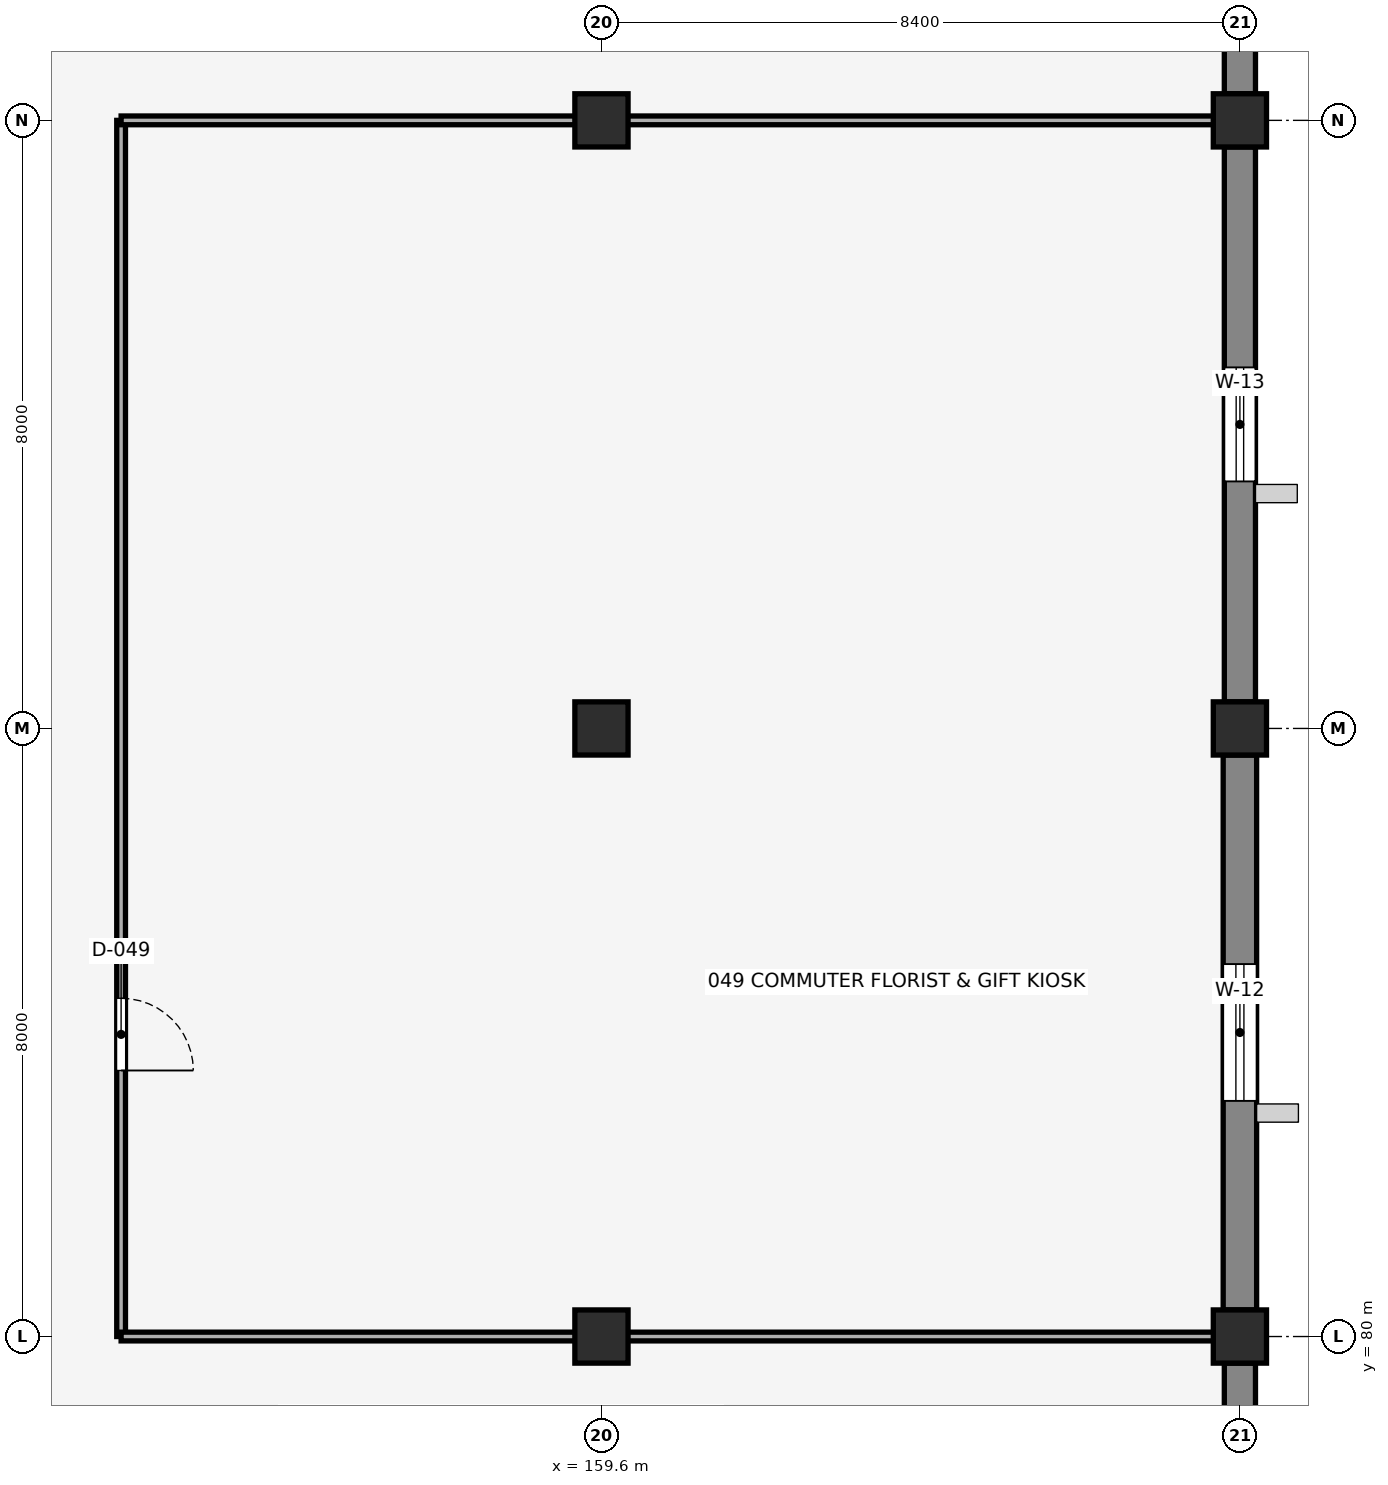
"""IFC4 building model, lengths in metres.
Left out: names, types, materials, properties, quantities, classifications, styles, units other than length and angle.
Written with IfcOpenShell. Run it as: python <this file> out.ifc"""

import sys

from ifc_helpers import new_model, si_unit, direction, frame, frame_2d, origin, origin_2d, place, context, subcontext, project, spatial, rectangle, extrude, element, fill, save


model = new_model("IFC4")
c1 = context("Model", 3, precision=1e-05, world=origin(), true_north=direction((0.0, 1.0)))
c2 = subcontext(c1, "Body", "Model", "MODEL_VIEW")
j1 = project(units=[si_unit("LENGTHUNIT", "METRE"), si_unit("PLANEANGLEUNIT", "RADIAN")], contexts=[c1])
p1 = place(None, origin())
s1 = spatial("IfcSite", under=j1, at=p1, CompositionType="ELEMENT")
p2 = place(p1, origin())
s2 = spatial("IfcBuilding", under=s1, at=p2, CompositionType="ELEMENT")
p3 = place(p2, origin())
s3 = spatial("IfcBuildingStorey", under=s2, at=p3, CompositionType="ELEMENT", Elevation=0.0)
for number, where, z_axis, x_axis in (
    (1, (159.6, 80.0, 0.0), (0.0, 0.0, 1.0), (1.0, 0.0, 0.0)),
    (2, (159.6, 88.0, 0.0), (0.0, 0.0, 1.0), (1.0, 0.0, 0.0)),
    (3, (159.6, 96.0, 0.0), (0.0, 0.0, 1.0), (1.0, 0.0, 0.0)),
    (4, (168.0, 80.0, 0.0), (0.0, 0.0, 1.0), (1.0, 0.0, 0.0)),
    (5, (168.0, 88.0, 0.0), (0.0, 0.0, 1.0), (1.0, 0.0, 0.0)),
    (6, (168.0, 96.0, 0.0), (0.0, 0.0, 1.0), (1.0, 0.0, 0.0)),
):
    element("IfcColumn", number, at=place(p3, frame(where, z_axis=z_axis, x_axis=x_axis)), inside=s3, PredefinedType="COLUMN", context=c2, shape_type="SweptSolid", body=[
        extrude(rectangle(XDim=0.7, YDim=0.7, at=origin_2d()), origin(), (0.0, 0.0, 1.0), 5.15),
    ])
p4 = place(p3, frame((168.0, 96.35, 0.0), z_axis=(0.0, 0.0, 1.0), x_axis=(0.0, 1.0, 0.0)))
e7 = element("IfcWall", 7, at=p4, inside=s3, PredefinedType="SOLIDWALL", context=c2, shape_type="SweptSolid", body=[
    extrude(rectangle(XDim=7.325, YDim=0.41, at=frame_2d((3.663, 0.0))), origin(), (0.0, 0.0, 1.0), 4.747),
])
p5 = place(p4, frame((2.562, 0.0, 0.9), z_axis=(0.0, 0.0, 1.0), x_axis=(1.0, 0.0, 0.0)))
e8 = element("IfcOpeningElement", 8, at=p5, cuts=e7, PredefinedType="OPENING", context=c2, shape_type="SweptSolid", body=[
    extrude(rectangle(XDim=2.2, YDim=1.5, at=frame_2d((1.1, 0.75))), frame((0.0, 0.215, 0.0), z_axis=(0.0, -1.0, 0.0), x_axis=(1.0, 0.0, 0.0)), (0.0, 0.0, 1.0), 0.43),
])
p6 = place(p3, frame((168.0, 72.35, 0.0), z_axis=(0.0, 0.0, 1.0), x_axis=(0.0, 1.0, 0.0)))
e9 = element("IfcWall", 9, at=p6, inside=s3, PredefinedType="SOLIDWALL", context=c2, shape_type="SweptSolid", body=[
    extrude(rectangle(XDim=7.3, YDim=0.41, at=frame_2d((3.65, 0.0))), origin(), (0.0, 0.0, 1.0), 4.85),
])
p7 = place(p3, frame((168.0, 80.35, 0.0), z_axis=(0.0, 0.0, 1.0), x_axis=(0.0, 1.0, 0.0)))
e10 = element("IfcWall", 10, at=p7, inside=s3, PredefinedType="SOLIDWALL", context=c2, shape_type="SweptSolid", body=[
    extrude(rectangle(XDim=7.3, YDim=0.44, at=frame_2d((3.65, 0.0))), origin(), (0.0, 0.0, 1.0), 4.747),
])
p8 = place(p7, frame((2.75, 0.0, 0.9), z_axis=(0.0, 0.0, 1.0), x_axis=(1.0, 0.0, 0.0)))
e11 = element("IfcOpeningElement", 11, at=p8, cuts=e10, PredefinedType="OPENING", context=c2, shape_type="SweptSolid", body=[
    extrude(rectangle(XDim=1.8, YDim=1.3, at=frame_2d((0.9, 0.65))), frame((0.0, 0.23, 0.0), z_axis=(0.0, -1.0, 0.0), x_axis=(1.0, 0.0, 0.0)), (0.0, 0.0, 1.0), 0.46),
])
p9 = place(p3, frame((168.0, 88.35, 0.0), z_axis=(0.0, 0.0, 1.0), x_axis=(0.0, 1.0, 0.0)))
e12 = element("IfcWall", 12, at=p9, inside=s3, PredefinedType="SOLIDWALL", context=c2, shape_type="SweptSolid", body=[
    extrude(rectangle(XDim=7.3, YDim=0.41, at=frame_2d((3.65, 0.0))), origin(), (0.0, 0.0, 1.0), 4.747),
])
p10 = place(p9, frame((2.9, 0.0, 0.9), z_axis=(0.0, 0.0, 1.0), x_axis=(1.0, 0.0, 0.0)))
e13 = element("IfcOpeningElement", 13, at=p10, cuts=e12, PredefinedType="OPENING", context=c2, shape_type="SweptSolid", body=[
    extrude(rectangle(XDim=1.5, YDim=1.4, at=frame_2d((0.75, 0.7))), frame((0.0, 0.215, 0.0), z_axis=(0.0, -1.0, 0.0), x_axis=(1.0, 0.0, 0.0)), (0.0, 0.0, 1.0), 0.43),
])
p11 = place(p3, frame((153.28, 80.0, 0.0), z_axis=(0.0, 0.0, 1.0), x_axis=(0.0, 1.0, 0.0)))
e14 = element("IfcWall", 14, at=p11, inside=s3, PredefinedType="PARTITIONING", context=c2, shape_type="SweptSolid", body=[
    extrude(rectangle(XDim=16.0, YDim=0.115, at=frame_2d((8.0, 0.0))), origin(), (0.0, 0.0, 1.0), 5.15),
])
p12 = place(p11, frame((4.45, 0.0, 0.0), z_axis=(0.0, 0.0, 1.0), x_axis=(-1.0, 0.0, 0.0)))
e15 = element("IfcOpeningElement", 15, at=p12, cuts=e14, PredefinedType="OPENING", context=c2, shape_type="SweptSolid", body=[
    extrude(rectangle(XDim=0.95, YDim=2.15, at=frame_2d((0.475, 1.075))), frame((0.0, 0.067, 0.0), z_axis=(0.0, -1.0, 0.0), x_axis=(1.0, 0.0, 0.0)), (0.0, 0.0, 1.0), 0.135),
])
p13 = place(p3, frame((153.28, 80.0, 0.0), z_axis=(0.0, 0.0, 1.0), x_axis=(1.0, 0.0, 0.0)))
e16 = element("IfcWall", 16, at=p13, inside=s3, PredefinedType="PARTITIONING", context=c2, shape_type="SweptSolid", body=[
    extrude(rectangle(XDim=5.98, YDim=0.115, at=frame_2d((2.99, 0.0))), origin(), (0.0, 0.0, 1.0), 4.605),
])
p14 = place(p3, frame((159.94, 80.0, 0.0), z_axis=(0.0, 0.0, 1.0), x_axis=(1.0, 0.0, 0.0)))
e17 = element("IfcWall", 17, at=p14, inside=s3, PredefinedType="PARTITIONING", context=c2, shape_type="SweptSolid", body=[
    extrude(rectangle(XDim=7.72, YDim=0.115, at=frame_2d((3.86, 0.0))), origin(), (0.0, 0.0, 1.0), 4.605),
])
p15 = place(p3, frame((153.28, 96.0, 0.0), z_axis=(0.0, 0.0, 1.0), x_axis=(1.0, 0.0, 0.0)))
e18 = element("IfcWall", 18, at=p15, inside=s3, PredefinedType="PARTITIONING", context=c2, shape_type="SweptSolid", body=[
    extrude(rectangle(XDim=5.98, YDim=0.115, at=frame_2d((2.99, 0.0))), origin(), (0.0, 0.0, 1.0), 4.605),
])
p16 = place(p3, frame((159.94, 96.0, 0.0), z_axis=(0.0, 0.0, 1.0), x_axis=(1.0, 0.0, 0.0)))
e19 = element("IfcWall", 19, at=p16, inside=s3, PredefinedType="PARTITIONING", context=c2, shape_type="SweptSolid", body=[
    extrude(rectangle(XDim=7.72, YDim=0.115, at=frame_2d((3.86, 0.0))), origin(), (0.0, 0.0, 1.0), 4.605),
])
p17 = place(p8, origin())
e20 = element("IfcWindow", 20, at=p17, inside=s3, PartitioningType="DOUBLE_PANEL_VERTICAL", PredefinedType="WINDOW", context=c2, shape_type="SweptSolid", body=[
    extrude(rectangle(XDim=1.8, YDim=1.3, at=frame_2d((0.9, 0.65))), frame((0.0, 0.03, 0.0), z_axis=(0.0, -1.0, 0.0), x_axis=(1.0, 0.0, 0.0)), (0.0, 0.0, 1.0), 0.06),
])
fill(e11, e20)
p18 = place(p10, origin())
e21 = element("IfcWindow", 21, at=p18, inside=s3, PartitioningType="SINGLE_PANEL", PredefinedType="WINDOW", context=c2, shape_type="SweptSolid", body=[
    extrude(rectangle(XDim=1.5, YDim=1.4, at=frame_2d((0.75, 0.7))), frame((0.0, 0.03, 0.0), z_axis=(0.0, -1.0, 0.0), x_axis=(1.0, 0.0, 0.0)), (0.0, 0.0, 1.0), 0.06),
])
fill(e13, e21)
p19 = place(p12, origin())
e22 = element("IfcDoor", 22, at=p19, inside=s3, OperationType="SINGLE_SWING_RIGHT", PredefinedType="DOOR", context=c2, shape_type="SweptSolid", body=[
    extrude(rectangle(XDim=0.95, YDim=2.15, at=frame_2d((0.475, 1.075))), frame((0.0, 0.025, 0.0), z_axis=(0.0, -1.0, 0.0), x_axis=(1.0, 0.0, 0.0)), (0.0, 0.0, 1.0), 0.05),
])
fill(e15, e22)
save(model, sys.argv[1])
